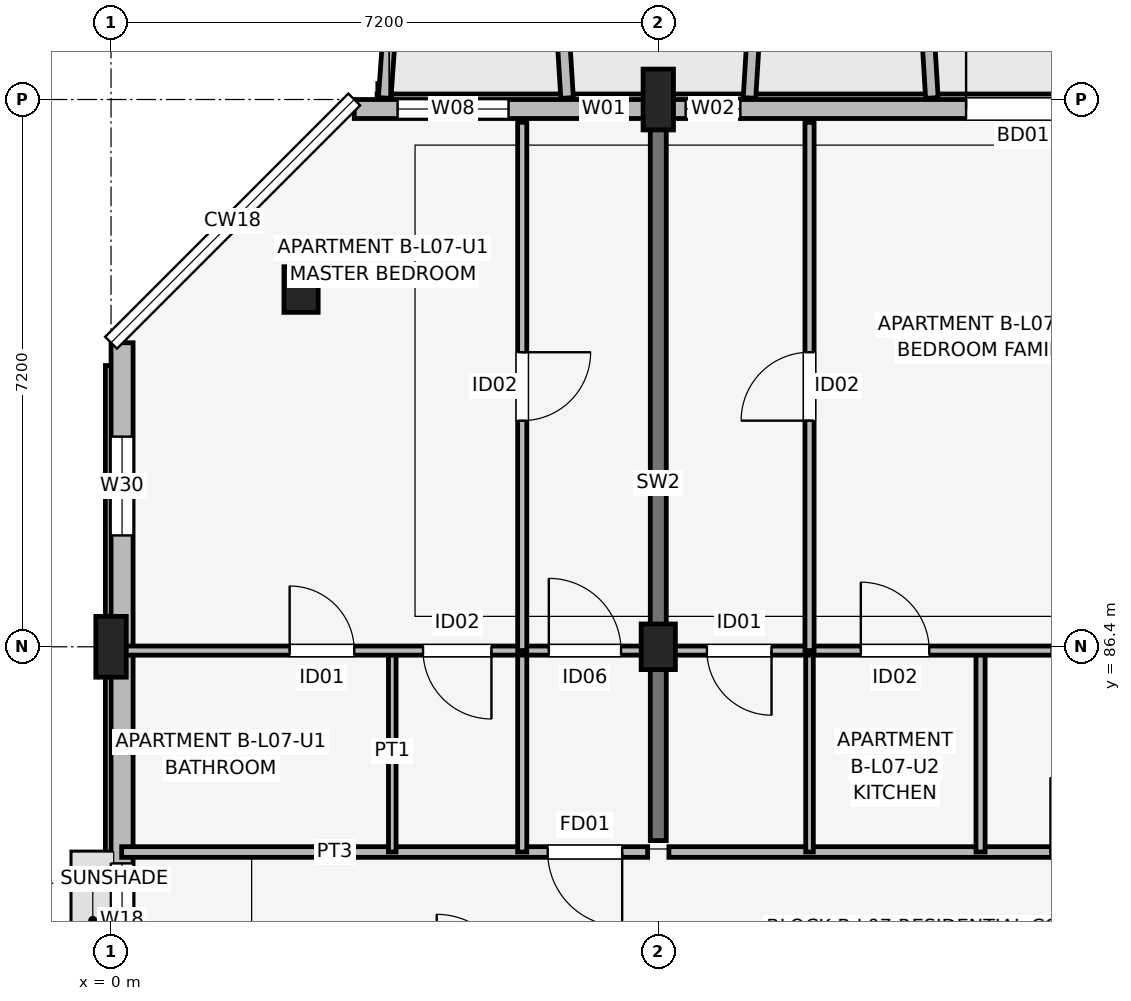
"""IFC4 building model, lengths in metres.
Left out: names, types, materials, properties, quantities, classifications, styles, units other than length and angle.
Written with IfcOpenShell. Run it as: python <this file> out.ifc"""

import sys

from ifc_helpers import new_model, si_unit, direction, frame, frame_2d, origin, origin_2d, place, context, subcontext, project, spatial, rectangle, extrude, element, fill, save


model = new_model("IFC4")
c1 = context("Model", 3, precision=1e-05, world=origin(), true_north=direction((0.0, 1.0)))
c2 = subcontext(c1, "Body", "Model", "MODEL_VIEW")
j1 = project(units=[si_unit("LENGTHUNIT", "METRE"), si_unit("PLANEANGLEUNIT", "RADIAN")], contexts=[c1])
p1 = place(None, origin())
s1 = spatial("IfcSite", under=j1, at=p1, CompositionType="ELEMENT")
p2 = place(p1, origin())
s2 = spatial("IfcBuilding", under=s1, at=p2, CompositionType="ELEMENT")
p3 = place(p2, frame((0.0, 0.0, 24.45)))
s3 = spatial("IfcBuildingStorey", under=s2, at=p3, CompositionType="ELEMENT", Elevation=24.45)
p4 = place(p3, frame((0.0, 86.4, 0.0), z_axis=(0.0, 0.0, 1.0), x_axis=(1.0, 0.0, 0.0)))
e1 = element("IfcColumn", 1, at=p4, inside=s3, PredefinedType="COLUMN", context=c2, shape_type="SweptSolid", body=[
    extrude(rectangle(XDim=0.4, YDim=0.8, at=origin_2d()), origin(), (0.0, 0.0, 1.0), 3.15),
])
for number, where, z_axis, x_axis in (
    (2, (2.5, 91.1, 0.0), (0.0, 0.0, 1.0), (1.0, 0.0, 0.0)),
    (3, (7.2, 86.4, 0.0), (0.0, 0.0, 1.0), (1.0, 0.0, 0.0)),
):
    element("IfcColumn", number, at=place(p3, frame(where, z_axis=z_axis, x_axis=x_axis)), inside=s3, PredefinedType="COLUMN", context=c2, shape_type="SweptSolid", body=[
        extrude(rectangle(XDim=0.45, YDim=0.6, at=origin_2d()), origin(), (0.0, 0.0, 1.0), 3.15),
    ])
p5 = place(p3, frame((7.2, 93.6, 0.0), z_axis=(0.0, 0.0, 1.0), x_axis=(1.0, 0.0, 0.0)))
e4 = element("IfcColumn", 4, at=p5, inside=s3, PredefinedType="COLUMN", context=c2, shape_type="SweptSolid", body=[
    extrude(rectangle(XDim=0.4, YDim=0.8, at=origin_2d()), origin(), (0.0, 0.0, 1.0), 3.15),
])
p6 = place(p3, frame((7.2, 83.85, 0.0), z_axis=(0.0, 0.0, 1.0), x_axis=(0.0, 1.0, 0.0)))
e5 = element("IfcWall", 5, at=p6, inside=s3, PredefinedType="SHEAR", context=c2, shape_type="SweptSolid", body=[
    extrude(rectangle(XDim=9.4, YDim=0.21, at=frame_2d((4.7, 0.0))), origin(), (0.0, 0.0, 1.0), 3.15),
])
p7 = place(p3, frame((32.8, 93.475, 0.0), z_axis=(0.0, 0.0, 1.0), x_axis=(-1.0, 0.0, 0.0)))
e6 = element("IfcWall", 6, at=p7, inside=s3, PredefinedType="SOLIDWALL", context=c2, shape_type="SweptSolid", body=[
    extrude(rectangle(XDim=29.6, YDim=0.25, at=frame_2d((14.8, 0.0))), origin(), (0.0, 0.0, 1.0), 2.43),
])
p8 = place(p7, frame((21.55, 0.0, 0.0), z_axis=(0.0, 0.0, 1.0), x_axis=(-1.0, 0.0, 0.0)))
e7 = element("IfcOpeningElement", 7, at=p8, cuts=e6, PredefinedType="OPENING", context=c2, shape_type="SweptSolid", body=[
    extrude(rectangle(XDim=1.5, YDim=2.15, at=frame_2d((0.75, 1.075))), frame((0.0, 0.135, 0.0), z_axis=(0.0, -1.0, 0.0), x_axis=(1.0, 0.0, 0.0)), (0.0, 0.0, 1.0), 0.27),
])
p9 = place(p7, frame((7.3, 0.0, 0.0), z_axis=(0.0, 0.0, 1.0), x_axis=(-1.0, 0.0, 0.0)))
e8 = element("IfcOpeningElement", 8, at=p9, cuts=e6, PredefinedType="OPENING", context=c2, shape_type="SweptSolid", body=[
    extrude(rectangle(XDim=1.8, YDim=2.15, at=frame_2d((0.9, 1.075))), frame((0.0, 0.135, 0.0), z_axis=(0.0, -1.0, 0.0), x_axis=(1.0, 0.0, 0.0)), (0.0, 0.0, 1.0), 0.27),
])
p10 = place(p7, frame((27.57, 0.0, 0.7)))
e9 = element("IfcOpeningElement", 9, at=p10, cuts=e6, PredefinedType="OPENING", context=c2, shape_type="SweptSolid", body=[
    extrude(rectangle(XDim=1.46, YDim=1.55, at=frame_2d((0.73, 0.775))), frame((0.0, 0.135, 0.0), z_axis=(0.0, -1.0, 0.0), x_axis=(1.0, 0.0, 0.0)), (0.0, 0.0, 1.0), 0.27),
])
p11 = place(p7, frame((26.02, 0.0, 0.75)))
e10 = element("IfcOpeningElement", 10, at=p11, cuts=e6, PredefinedType="OPENING", context=c2, shape_type="SweptSolid", body=[
    extrude(rectangle(XDim=0.6, YDim=1.25, at=frame_2d((0.3, 0.625))), frame((0.0, 0.135, 0.0), z_axis=(0.0, -1.0, 0.0), x_axis=(1.0, 0.0, 0.0)), (0.0, 0.0, 1.0), 0.27),
])
p12 = place(p7, frame((24.52, 0.0, 0.75)))
e11 = element("IfcOpeningElement", 11, at=p12, cuts=e6, PredefinedType="OPENING", context=c2, shape_type="SweptSolid", body=[
    extrude(rectangle(XDim=0.72, YDim=1.35, at=frame_2d((0.36, 0.675))), frame((0.0, 0.135, 0.0), z_axis=(0.0, -1.0, 0.0), x_axis=(1.0, 0.0, 0.0)), (0.0, 0.0, 1.0), 0.27),
])
p13 = place(p7, frame((14.925, 0.0, 0.67)))
e12 = element("IfcOpeningElement", 12, at=p13, cuts=e6, PredefinedType="OPENING", context=c2, shape_type="SweptSolid", body=[
    extrude(rectangle(XDim=2.15, YDim=1.65, at=frame_2d((1.075, 0.825))), frame((0.0, 0.135, 0.0), z_axis=(0.0, -1.0, 0.0), x_axis=(1.0, 0.0, 0.0)), (0.0, 0.0, 1.0), 0.27),
])
p14 = place(p7, frame((12.815, 0.0, 0.75)))
e13 = element("IfcOpeningElement", 13, at=p14, cuts=e6, PredefinedType="OPENING", context=c2, shape_type="SweptSolid", body=[
    extrude(rectangle(XDim=1.22, YDim=1.5, at=frame_2d((0.61, 0.75))), frame((0.0, 0.135, 0.0), z_axis=(0.0, -1.0, 0.0), x_axis=(1.0, 0.0, 0.0)), (0.0, 0.0, 1.0), 0.27),
])
p15 = place(p7, frame((10.12, 0.0, 0.75)))
e14 = element("IfcOpeningElement", 14, at=p15, cuts=e6, PredefinedType="OPENING", context=c2, shape_type="SweptSolid", body=[
    extrude(rectangle(XDim=0.72, YDim=1.35, at=frame_2d((0.36, 0.675))), frame((0.0, 0.135, 0.0), z_axis=(0.0, -1.0, 0.0), x_axis=(1.0, 0.0, 0.0)), (0.0, 0.0, 1.0), 0.27),
])
p16 = place(p7, frame((2.92, 0.0, 0.75)))
e15 = element("IfcOpeningElement", 15, at=p16, cuts=e6, PredefinedType="OPENING", context=c2, shape_type="SweptSolid", body=[
    extrude(rectangle(XDim=0.72, YDim=1.35, at=frame_2d((0.36, 0.675))), frame((0.0, 0.135, 0.0), z_axis=(0.0, -1.0, 0.0), x_axis=(1.0, 0.0, 0.0)), (0.0, 0.0, 1.0), 0.27),
])
p17 = place(p7, frame((0.87, 0.0, 0.75)))
e16 = element("IfcOpeningElement", 16, at=p17, cuts=e6, PredefinedType="OPENING", context=c2, shape_type="SweptSolid", body=[
    extrude(rectangle(XDim=0.6, YDim=1.25, at=frame_2d((0.3, 0.625))), frame((0.0, 0.135, 0.0), z_axis=(0.0, -1.0, 0.0), x_axis=(1.0, 0.0, 0.0)), (0.0, 0.0, 1.0), 0.27),
])
p18 = place(p3, frame((0.145, 90.4, 0.0), z_axis=(0.0, 0.0, 1.0), x_axis=(0.0, -1.0, 0.0)))
e17 = element("IfcWall", 17, at=p18, inside=s3, PredefinedType="SOLIDWALL", context=c2, shape_type="SweptSolid", body=[
    extrude(rectangle(XDim=15.2, YDim=0.29, at=frame_2d((7.6, 0.0))), origin(), (0.0, 0.0, 1.0), 2.43),
])
p19 = place(p18, frame((6.85, 0.0, 1.05)))
e18 = element("IfcOpeningElement", 18, at=p19, cuts=e17, PredefinedType="OPENING", context=c2, shape_type="SweptSolid", body=[
    extrude(rectangle(XDim=1.5, YDim=1.15, at=frame_2d((0.75, 0.575))), frame((0.0, 0.155, 0.0), z_axis=(0.0, -1.0, 0.0), x_axis=(1.0, 0.0, 0.0)), (0.0, 0.0, 1.0), 0.31),
])
p20 = place(p18, frame((1.235, 0.0, 0.75)))
e19 = element("IfcOpeningElement", 19, at=p20, cuts=e17, PredefinedType="OPENING", context=c2, shape_type="SweptSolid", body=[
    extrude(rectangle(XDim=1.3, YDim=1.55, at=frame_2d((0.65, 0.775))), frame((0.0, 0.155, 0.0), z_axis=(0.0, -1.0, 0.0), x_axis=(1.0, 0.0, 0.0)), (0.0, 0.0, 1.0), 0.31),
])
p21 = place(p3, frame((3.6, 93.62, 0.0), z_axis=(0.0, 0.0, 1.0), x_axis=(0.071194071069, 0.997462482625, 0.0)))
e20 = element("IfcWall", 20, at=p21, inside=s3, PredefinedType="ELEMENTEDWALL", context=c2, shape_type="SweptSolid", body=[
    extrude(rectangle(XDim=1.965, YDim=0.165, at=frame_2d((0.982, 0.0))), origin(), (0.0, 0.0, 1.0), 2.95),
])
p22 = place(p3, frame((6.0, 93.62, 0.0), z_axis=(0.0, 0.0, 1.0), x_axis=(-0.061170732449, 0.998127317276, 0.0)))
e21 = element("IfcWall", 21, at=p22, inside=s3, PredefinedType="ELEMENTEDWALL", context=c2, shape_type="SweptSolid", body=[
    extrude(rectangle(XDim=1.964, YDim=0.165, at=frame_2d((0.982, 0.0))), origin(), (0.0, 0.0, 1.0), 2.95),
])
for number, where, z_axis, x_axis in (
    (22, (8.4, 93.62, 0.0), (0.0, 0.0, 1.0), (0.061, 0.998, 0.0)),
    (23, (10.8, 93.62, 0.0), (0.0, 0.0, 1.0), (-0.061, 0.998, 0.0)),
):
    element("IfcWall", number, at=place(p3, frame(where, z_axis=z_axis, x_axis=x_axis)), inside=s3, PredefinedType="ELEMENTEDWALL", context=c2, shape_type="SweptSolid", body=[
        extrude(rectangle(XDim=1.964, YDim=0.165, at=frame_2d((0.982, 0.0))), origin(), (0.0, 0.0, 1.0), 2.53),
    ])
p23 = place(p3, frame((0.14, 83.7, 0.0), z_axis=(0.0, 0.0, 1.0), x_axis=(1.0, 0.0, 0.0)))
e24 = element("IfcWall", 24, at=p23, inside=s3, PredefinedType="PARTITIONING", context=c2, shape_type="SweptSolid", body=[
    extrude(rectangle(XDim=6.92, YDim=0.14, at=frame_2d((3.46, 0.0))), origin(), (0.0, 0.0, 1.0), 2.38),
])
p24 = place(p23, frame((6.585, 0.0, 0.0), z_axis=(0.0, 0.0, 1.0), x_axis=(-1.0, 0.0, 0.0)))
e25 = element("IfcOpeningElement", 25, at=p24, cuts=e24, PredefinedType="OPENING", context=c2, shape_type="SweptSolid", body=[
    extrude(rectangle(XDim=0.98, YDim=2.1, at=frame_2d((0.49, 1.05))), frame((0.0, 0.08, 0.0), z_axis=(0.0, -1.0, 0.0), x_axis=(1.0, 0.0, 0.0)), (0.0, 0.0, 1.0), 0.16),
])
p25 = place(p3, frame((3.7, 83.7, 0.0), z_axis=(0.0, 0.0, 1.0), x_axis=(0.0, 1.0, 0.0)))
e26 = element("IfcWall", 26, at=p25, inside=s3, PredefinedType="PARTITIONING", context=c2, shape_type="SweptSolid", body=[
    extrude(rectangle(XDim=2.65, YDim=0.1, at=frame_2d((1.325, 0.0))), origin(), (0.0, 0.0, 1.0), 2.38),
])
p26 = place(p3, frame((5.41, 83.7, 0.0), z_axis=(0.0, 0.0, 1.0), x_axis=(0.0, 1.0, 0.0)))
e27 = element("IfcWall", 27, at=p26, inside=s3, PredefinedType="PARTITIONING", context=c2, shape_type="SweptSolid", body=[
    extrude(rectangle(XDim=2.65, YDim=0.12, at=frame_2d((1.325, 0.0))), origin(), (0.0, 0.0, 1.0), 2.38),
])
p27 = place(p3, frame((0.14, 86.35, 0.0), z_axis=(0.0, 0.0, 1.0), x_axis=(1.0, 0.0, 0.0)))
e28 = element("IfcWall", 28, at=p27, inside=s3, PredefinedType="PARTITIONING", context=c2, shape_type="SweptSolid", body=[
    extrude(rectangle(XDim=6.92, YDim=0.12, at=frame_2d((3.46, 0.0))), origin(), (0.0, 0.0, 1.0), 2.38),
])
p28 = place(p27, frame((2.21, 0.0, 0.0)))
e29 = element("IfcOpeningElement", 29, at=p28, cuts=e28, PredefinedType="OPENING", context=c2, shape_type="SweptSolid", body=[
    extrude(rectangle(XDim=0.85, YDim=2.08, at=frame_2d((0.425, 1.04))), frame((0.0, 0.07, 0.0), z_axis=(0.0, -1.0, 0.0), x_axis=(1.0, 0.0, 0.0)), (0.0, 0.0, 1.0), 0.14),
])
p29 = place(p27, frame((4.865, 0.0, 0.0), z_axis=(0.0, 0.0, 1.0), x_axis=(-1.0, 0.0, 0.0)))
e30 = element("IfcOpeningElement", 30, at=p29, cuts=e28, PredefinedType="OPENING", context=c2, shape_type="SweptSolid", body=[
    extrude(rectangle(XDim=0.9, YDim=2.08, at=frame_2d((0.45, 1.04))), frame((0.0, 0.07, 0.0), z_axis=(0.0, -1.0, 0.0), x_axis=(1.0, 0.0, 0.0)), (0.0, 0.0, 1.0), 0.14),
])
p30 = place(p27, frame((5.62, 0.0, 0.0)))
e31 = element("IfcOpeningElement", 31, at=p30, cuts=e28, PredefinedType="OPENING", context=c2, shape_type="SweptSolid", body=[
    extrude(rectangle(XDim=0.95, YDim=2.08, at=frame_2d((0.475, 1.04))), frame((0.0, 0.07, 0.0), z_axis=(0.0, -1.0, 0.0), x_axis=(1.0, 0.0, 0.0)), (0.0, 0.0, 1.0), 0.14),
])
p31 = place(p3, frame((5.41, 86.35, 0.0), z_axis=(0.0, 0.0, 1.0), x_axis=(0.0, 1.0, 0.0)))
e32 = element("IfcWall", 32, at=p31, inside=s3, PredefinedType="PARTITIONING", context=c2, shape_type="SweptSolid", body=[
    extrude(rectangle(XDim=6.95, YDim=0.12, at=frame_2d((3.475, 0.0))), origin(), (0.0, 0.0, 1.0), 2.38),
])
p32 = place(p31, frame((3.925, 0.0, 0.0), z_axis=(0.0, 0.0, 1.0), x_axis=(-1.0, 0.0, 0.0)))
e33 = element("IfcOpeningElement", 33, at=p32, cuts=e32, PredefinedType="OPENING", context=c2, shape_type="SweptSolid", body=[
    extrude(rectangle(XDim=0.9, YDim=2.08, at=frame_2d((0.45, 1.04))), frame((0.0, 0.07, 0.0), z_axis=(0.0, -1.0, 0.0), x_axis=(1.0, 0.0, 0.0)), (0.0, 0.0, 1.0), 0.14),
])
p33 = place(p3, frame((7.34, 83.7, 0.0), z_axis=(0.0, 0.0, 1.0), x_axis=(1.0, 0.0, 0.0)))
e34 = element("IfcWall", 34, at=p33, inside=s3, PredefinedType="PARTITIONING", context=c2, shape_type="SweptSolid", body=[
    extrude(rectangle(XDim=6.92, YDim=0.14, at=frame_2d((3.46, 0.0))), origin(), (0.0, 0.0, 1.0), 2.38),
])
p34 = place(p33, frame((5.02, 0.0, 0.0)))
e35 = element("IfcOpeningElement", 35, at=p34, cuts=e34, PredefinedType="OPENING", context=c2, shape_type="SweptSolid", body=[
    extrude(rectangle(XDim=0.98, YDim=2.1, at=frame_2d((0.49, 1.05))), frame((0.0, 0.08, 0.0), z_axis=(0.0, -1.0, 0.0), x_axis=(1.0, 0.0, 0.0)), (0.0, 0.0, 1.0), 0.16),
])
p35 = place(p3, frame((9.19, 83.7, 0.0), z_axis=(0.0, 0.0, 1.0), x_axis=(0.0, 1.0, 0.0)))
e36 = element("IfcWall", 36, at=p35, inside=s3, PredefinedType="PARTITIONING", context=c2, shape_type="SweptSolid", body=[
    extrude(rectangle(XDim=2.65, YDim=0.1, at=frame_2d((1.325, 0.0))), origin(), (0.0, 0.0, 1.0), 2.38),
])
p36 = place(p3, frame((11.44, 83.7, 0.0), z_axis=(0.0, 0.0, 1.0), x_axis=(0.0, 1.0, 0.0)))
e37 = element("IfcWall", 37, at=p36, inside=s3, PredefinedType="PARTITIONING", context=c2, shape_type="SweptSolid", body=[
    extrude(rectangle(XDim=2.65, YDim=0.12, at=frame_2d((1.325, 0.0))), origin(), (0.0, 0.0, 1.0), 2.38),
])
p37 = place(p3, frame((7.34, 86.35, 0.0), z_axis=(0.0, 0.0, 1.0), x_axis=(1.0, 0.0, 0.0)))
e38 = element("IfcWall", 38, at=p37, inside=s3, PredefinedType="PARTITIONING", context=c2, shape_type="SweptSolid", body=[
    extrude(rectangle(XDim=6.92, YDim=0.12, at=frame_2d((3.46, 0.0))), origin(), (0.0, 0.0, 1.0), 2.38),
])
p38 = place(p37, frame((1.35, 0.0, 0.0), z_axis=(0.0, 0.0, 1.0), x_axis=(-1.0, 0.0, 0.0)))
e39 = element("IfcOpeningElement", 39, at=p38, cuts=e38, PredefinedType="OPENING", context=c2, shape_type="SweptSolid", body=[
    extrude(rectangle(XDim=0.85, YDim=2.08, at=frame_2d((0.425, 1.04))), frame((0.0, 0.07, 0.0), z_axis=(0.0, -1.0, 0.0), x_axis=(1.0, 0.0, 0.0)), (0.0, 0.0, 1.0), 0.14),
])
p39 = place(p37, frame((2.525, 0.0, 0.0)))
e40 = element("IfcOpeningElement", 40, at=p39, cuts=e38, PredefinedType="OPENING", context=c2, shape_type="SweptSolid", body=[
    extrude(rectangle(XDim=0.9, YDim=2.08, at=frame_2d((0.45, 1.04))), frame((0.0, 0.07, 0.0), z_axis=(0.0, -1.0, 0.0), x_axis=(1.0, 0.0, 0.0)), (0.0, 0.0, 1.0), 0.14),
])
p40 = place(p37, frame((5.985, 0.0, 0.0), z_axis=(0.0, 0.0, 1.0), x_axis=(-1.0, 0.0, 0.0)))
e41 = element("IfcOpeningElement", 41, at=p40, cuts=e38, PredefinedType="OPENING", context=c2, shape_type="SweptSolid", body=[
    extrude(rectangle(XDim=0.95, YDim=2.08, at=frame_2d((0.475, 1.04))), frame((0.0, 0.07, 0.0), z_axis=(0.0, -1.0, 0.0), x_axis=(1.0, 0.0, 0.0)), (0.0, 0.0, 1.0), 0.14),
])
p41 = place(p3, frame((9.19, 86.35, 0.0), z_axis=(0.0, 0.0, 1.0), x_axis=(0.0, 1.0, 0.0)))
e42 = element("IfcWall", 42, at=p41, inside=s3, PredefinedType="PARTITIONING", context=c2, shape_type="SweptSolid", body=[
    extrude(rectangle(XDim=6.95, YDim=0.12, at=frame_2d((3.475, 0.0))), origin(), (0.0, 0.0, 1.0), 2.38),
])
p42 = place(p41, frame((3.025, 0.0, 0.0)))
e43 = element("IfcOpeningElement", 43, at=p42, cuts=e42, PredefinedType="OPENING", context=c2, shape_type="SweptSolid", body=[
    extrude(rectangle(XDim=0.9, YDim=2.08, at=frame_2d((0.45, 1.04))), frame((0.0, 0.07, 0.0), z_axis=(0.0, -1.0, 0.0), x_axis=(1.0, 0.0, 0.0)), (0.0, 0.0, 1.0), 0.14),
])
p43 = place(p8, origin())
e44 = element("IfcDoor", 44, at=p43, inside=s3, OperationType="SINGLE_SWING_RIGHT", PredefinedType="DOOR", context=c2, shape_type="SweptSolid", body=[
    extrude(rectangle(XDim=1.5, YDim=2.15, at=frame_2d((0.75, 1.075))), frame((0.0, 0.025, 0.0), z_axis=(0.0, -1.0, 0.0), x_axis=(1.0, 0.0, 0.0)), (0.0, 0.0, 1.0), 0.05),
])
fill(e7, e44)
p44 = place(p10, origin())
e45 = element("IfcWindow", 45, at=p44, inside=s3, PartitioningType="SINGLE_PANEL", PredefinedType="WINDOW", context=c2, shape_type="SweptSolid", body=[
    extrude(rectangle(XDim=1.46, YDim=1.55, at=frame_2d((0.73, 0.775))), frame((0.0, 0.03, 0.0), z_axis=(0.0, -1.0, 0.0), x_axis=(1.0, 0.0, 0.0)), (0.0, 0.0, 1.0), 0.06),
])
fill(e9, e45)
p45 = place(p11, origin())
e46 = element("IfcWindow", 46, at=p45, inside=s3, PartitioningType="SINGLE_PANEL", PredefinedType="WINDOW", context=c2, shape_type="SweptSolid", body=[
    extrude(rectangle(XDim=0.6, YDim=1.25, at=frame_2d((0.3, 0.625))), frame((0.0, 0.03, 0.0), z_axis=(0.0, -1.0, 0.0), x_axis=(1.0, 0.0, 0.0)), (0.0, 0.0, 1.0), 0.06),
])
fill(e10, e46)
p46 = place(p12, origin())
e47 = element("IfcWindow", 47, at=p46, inside=s3, PartitioningType="SINGLE_PANEL", PredefinedType="WINDOW", context=c2, shape_type="SweptSolid", body=[
    extrude(rectangle(XDim=0.72, YDim=1.35, at=frame_2d((0.36, 0.675))), frame((0.0, 0.03, 0.0), z_axis=(0.0, -1.0, 0.0), x_axis=(1.0, 0.0, 0.0)), (0.0, 0.0, 1.0), 0.06),
])
fill(e11, e47)
p47 = place(p19, origin())
e48 = element("IfcWindow", 48, at=p47, inside=s3, PartitioningType="SINGLE_PANEL", PredefinedType="WINDOW", context=c2, shape_type="SweptSolid", body=[
    extrude(rectangle(XDim=1.5, YDim=1.15, at=frame_2d((0.75, 0.575))), frame((0.0, 0.03, 0.0), z_axis=(0.0, -1.0, 0.0), x_axis=(1.0, 0.0, 0.0)), (0.0, 0.0, 1.0), 0.06),
])
fill(e18, e48)
p48 = place(p20, origin())
e49 = element("IfcWindow", 49, at=p48, inside=s3, PartitioningType="SINGLE_PANEL", PredefinedType="WINDOW", context=c2, shape_type="SweptSolid", body=[
    extrude(rectangle(XDim=1.3, YDim=1.55, at=frame_2d((0.65, 0.775))), frame((0.0, 0.03, 0.0), z_axis=(0.0, -1.0, 0.0), x_axis=(1.0, 0.0, 0.0)), (0.0, 0.0, 1.0), 0.06),
])
fill(e19, e49)
p49 = place(p24, origin())
e50 = element("IfcDoor", 50, at=p49, inside=s3, OperationType="SINGLE_SWING_RIGHT", PredefinedType="DOOR", context=c2, shape_type="SweptSolid", body=[
    extrude(rectangle(XDim=0.98, YDim=2.1, at=frame_2d((0.49, 1.05))), frame((0.0, 0.025, 0.0), z_axis=(0.0, -1.0, 0.0), x_axis=(1.0, 0.0, 0.0)), (0.0, 0.0, 1.0), 0.05),
])
fill(e25, e50)
p50 = place(p28, origin())
e51 = element("IfcDoor", 51, at=p50, inside=s3, OperationType="SINGLE_SWING_LEFT", PredefinedType="DOOR", context=c2, shape_type="SweptSolid", body=[
    extrude(rectangle(XDim=0.85, YDim=2.08, at=frame_2d((0.425, 1.04))), frame((0.0, 0.025, 0.0), z_axis=(0.0, -1.0, 0.0), x_axis=(1.0, 0.0, 0.0)), (0.0, 0.0, 1.0), 0.05),
])
fill(e29, e51)
p51 = place(p29, origin())
e52 = element("IfcDoor", 52, at=p51, inside=s3, OperationType="SINGLE_SWING_RIGHT", PredefinedType="DOOR", context=c2, shape_type="SweptSolid", body=[
    extrude(rectangle(XDim=0.9, YDim=2.08, at=frame_2d((0.45, 1.04))), frame((0.0, 0.025, 0.0), z_axis=(0.0, -1.0, 0.0), x_axis=(1.0, 0.0, 0.0)), (0.0, 0.0, 1.0), 0.05),
])
fill(e30, e52)
p52 = place(p30, origin())
e53 = element("IfcDoor", 53, at=p52, inside=s3, OperationType="SINGLE_SWING_LEFT", PredefinedType="DOOR", context=c2, shape_type="SweptSolid", body=[
    extrude(rectangle(XDim=0.95, YDim=2.08, at=frame_2d((0.475, 1.04))), frame((0.0, 0.025, 0.0), z_axis=(0.0, -1.0, 0.0), x_axis=(1.0, 0.0, 0.0)), (0.0, 0.0, 1.0), 0.05),
])
fill(e31, e53)
p53 = place(p32, origin())
e54 = element("IfcDoor", 54, at=p53, inside=s3, OperationType="SINGLE_SWING_RIGHT", PredefinedType="DOOR", context=c2, shape_type="SweptSolid", body=[
    extrude(rectangle(XDim=0.9, YDim=2.08, at=frame_2d((0.45, 1.04))), frame((0.0, 0.025, 0.0), z_axis=(0.0, -1.0, 0.0), x_axis=(1.0, 0.0, 0.0)), (0.0, 0.0, 1.0), 0.05),
])
fill(e33, e54)
p54 = place(p38, origin())
e55 = element("IfcDoor", 55, at=p54, inside=s3, OperationType="SINGLE_SWING_RIGHT", PredefinedType="DOOR", context=c2, shape_type="SweptSolid", body=[
    extrude(rectangle(XDim=0.85, YDim=2.08, at=frame_2d((0.425, 1.04))), frame((0.0, 0.025, 0.0), z_axis=(0.0, -1.0, 0.0), x_axis=(1.0, 0.0, 0.0)), (0.0, 0.0, 1.0), 0.05),
])
fill(e39, e55)
p55 = place(p39, origin())
e56 = element("IfcDoor", 56, at=p55, inside=s3, OperationType="SINGLE_SWING_LEFT", PredefinedType="DOOR", context=c2, shape_type="SweptSolid", body=[
    extrude(rectangle(XDim=0.9, YDim=2.08, at=frame_2d((0.45, 1.04))), frame((0.0, 0.025, 0.0), z_axis=(0.0, -1.0, 0.0), x_axis=(1.0, 0.0, 0.0)), (0.0, 0.0, 1.0), 0.05),
])
fill(e40, e56)
p56 = place(p42, origin())
e57 = element("IfcDoor", 57, at=p56, inside=s3, OperationType="SINGLE_SWING_LEFT", PredefinedType="DOOR", context=c2, shape_type="SweptSolid", body=[
    extrude(rectangle(XDim=0.9, YDim=2.08, at=frame_2d((0.45, 1.04))), frame((0.0, 0.025, 0.0), z_axis=(0.0, -1.0, 0.0), x_axis=(1.0, 0.0, 0.0)), (0.0, 0.0, 1.0), 0.05),
])
fill(e43, e57)
save(model, sys.argv[1])
